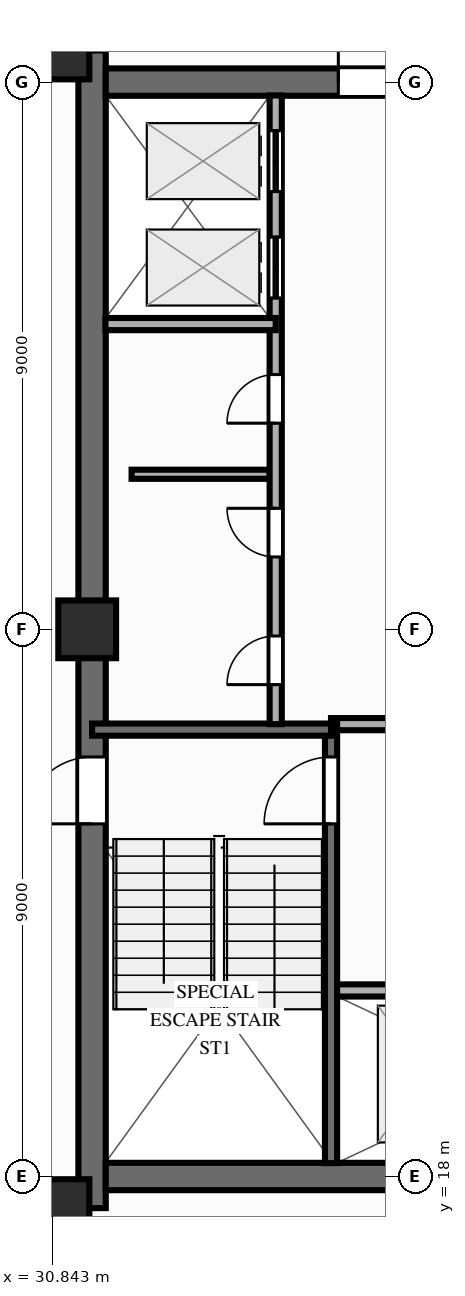
"""IFC4 building model, lengths in metres.
Left out: names, types, materials, properties, quantities, classifications, styles, units other than length and angle.
Written with IfcOpenShell. Run it as: python <this file> out.ifc"""

import sys

from ifc_helpers import new_model, si_unit, direction, frame, frame_2d, origin, origin_2d, place, context, subcontext, project, spatial, rectangle, extrude, source, transform, mapped, element, fill, save


model = new_model("IFC4")
c1 = context("Model", 3, precision=1e-05, world=origin(), true_north=direction((0.0, 1.0)))
c2 = subcontext(c1, "Body", "Model", "MODEL_VIEW")
j1 = project(units=[si_unit("LENGTHUNIT", "METRE"), si_unit("PLANEANGLEUNIT", "RADIAN")], contexts=[c1])
p1 = place(None, origin())
s1 = spatial("IfcSite", under=j1, at=p1, CompositionType="ELEMENT")
p2 = place(p1, origin())
s2 = spatial("IfcBuilding", under=s1, at=p2, CompositionType="ELEMENT")
p3 = place(p2, frame((0.0, 0.0, 216.3)))
s3 = spatial("IfcBuildingStorey", under=s2, at=p3, CompositionType="ELEMENT", Elevation=216.3)
p4 = place(p3, frame((31.5, 17.48, 0.0), z_axis=(0.0, 0.0, 1.0), x_axis=(0.0, 1.0, 0.0)))
e1 = element("IfcWall", 1, at=p4, inside=s3, PredefinedType="SHEAR", context=c2, shape_type="SweptSolid", body=[
    extrude(rectangle(XDim=19.04, YDim=0.45, at=frame_2d((9.52, 0.0))), origin(), (0.0, 0.0, 1.0), 3.9),
])
p5 = place(p4, frame((6.32, 0.0, 0.0)))
e2 = element("IfcOpeningElement", 2, at=p5, cuts=e1, PredefinedType="OPENING", context=c2, shape_type="SweptSolid", body=[
    extrude(rectangle(XDim=1.1, YDim=2.15, at=frame_2d((0.55, 1.075))), frame((0.0, 0.237, 0.0), z_axis=(0.0, -1.0, 0.0), x_axis=(1.0, 0.0, 0.0)), (0.0, 0.0, 1.0), 0.474),
])
p6 = place(p3, frame((31.725, 18.0, 0.0), z_axis=(0.0, 0.0, 1.0), x_axis=(1.0, 0.0, 0.0)))
e3 = element("IfcWall", 3, at=p6, inside=s3, PredefinedType="SHEAR", context=c2, shape_type="SweptSolid", body=[
    extrude(rectangle(XDim=12.55, YDim=0.45, at=frame_2d((6.275, 0.0))), origin(), (0.0, 0.0, 1.0), 3.9),
])
p7 = place(p3, frame((31.725, 36.0, 0.0), z_axis=(0.0, 0.0, 1.0), x_axis=(1.0, 0.0, 0.0)))
e4 = element("IfcWall", 4, at=p7, inside=s3, PredefinedType="SHEAR", context=c2, shape_type="SweptSolid", body=[
    extrude(rectangle(XDim=12.55, YDim=0.45, at=frame_2d((6.275, 0.0))), origin(), (0.0, 0.0, 1.0), 3.9),
])
p8 = place(p7, frame((5.225, 0.0, 0.0), z_axis=(0.0, 0.0, 1.0), x_axis=(-1.0, 0.0, 0.0)))
e5 = element("IfcOpeningElement", 5, at=p8, cuts=e4, PredefinedType="OPENING", context=c2, shape_type="SweptSolid", body=[
    extrude(rectangle(XDim=1.4, YDim=2.15, at=frame_2d((0.7, 1.075))), frame((0.0, 0.237, 0.0), z_axis=(0.0, -1.0, 0.0), x_axis=(1.0, 0.0, 0.0)), (0.0, 0.0, 1.0), 0.474),
])
m1 = source(origin(), c2, "Body", "SweptSolid", [
    extrude(rectangle(XDim=0.95, YDim=0.95, at=origin_2d()), origin(), (0.0, 0.0, 1.0), 3.9),
])
for number, where, z_axis, x_axis in (
    (6, (30.98, 17.48, 0.0), (0.0, 0.0, 1.0), (1.0, 0.0, 0.0)),
    (7, (30.98, 36.52, 0.0), (0.0, 0.0, 1.0), (1.0, 0.0, 0.0)),
    (8, (31.42, 27.0, 0.0), (0.0, 0.0, 1.0), (1.0, 0.0, 0.0)),
):
    element("IfcColumn", number, at=place(p3, frame(where, z_axis=z_axis, x_axis=x_axis)), inside=s3, PredefinedType="COLUMN", context=c2, shape_type="MappedRepresentation", body=[
        mapped(m1, transform((0.0, 0.0, 0.0), scale=1.0)),
    ])
p9 = place(p3, frame((32.15, 29.55, 0.0), z_axis=(0.0, 0.0, 1.0), x_axis=(1.0, 0.0, 0.0)))
e9 = element("IfcWall", 9, at=p9, inside=s3, PredefinedType="PARTITIONING", context=c2, shape_type="SweptSolid", body=[
    extrude(rectangle(XDim=2.27, YDim=0.15, at=frame_2d((1.135, 0.0))), origin(), (0.0, 0.0, 1.0), 3.56),
])
p10 = place(p3, frame((35.43, 21.06, 0.0), z_axis=(0.0, 0.0, 1.0), x_axis=(1.0, 0.0, 0.0)))
e10 = element("IfcWall", 10, at=p10, inside=s3, PredefinedType="PARTITIONING", context=c2, shape_type="SweptSolid", body=[
    extrude(rectangle(XDim=6.02, YDim=0.2, at=frame_2d((3.01, 0.0))), origin(), (0.0, 0.0, 1.0), 3.56),
])
p11 = place(p10, frame((1.0, 0.0, 0.0)))
e11 = element("IfcOpeningElement", 11, at=p11, cuts=e10, PredefinedType="OPENING", context=c2, shape_type="SweptSolid", body=[
    extrude(rectangle(XDim=1.1, YDim=2.15, at=frame_2d((0.55, 1.075))), frame((0.0, 0.112, 0.0), z_axis=(0.0, -1.0, 0.0), x_axis=(1.0, 0.0, 0.0)), (0.0, 0.0, 1.0), 0.224),
])
p12 = place(p10, frame((2.95, 0.0, 0.0)))
e12 = element("IfcOpeningElement", 12, at=p12, cuts=e10, PredefinedType="OPENING", context=c2, shape_type="SweptSolid", body=[
    extrude(rectangle(XDim=1.1, YDim=2.15, at=frame_2d((0.55, 1.075))), frame((0.0, 0.112, 0.0), z_axis=(0.0, -1.0, 0.0), x_axis=(1.0, 0.0, 0.0)), (0.0, 0.0, 1.0), 0.224),
])
p13 = place(p10, frame((4.58, 0.0, 0.0)))
e13 = element("IfcOpeningElement", 13, at=p13, cuts=e10, PredefinedType="OPENING", context=c2, shape_type="SweptSolid", body=[
    extrude(rectangle(XDim=1.2, YDim=2.15, at=frame_2d((0.6, 1.075))), frame((0.0, 0.112, 0.0), z_axis=(0.0, -1.0, 0.0), x_axis=(1.0, 0.0, 0.0)), (0.0, 0.0, 1.0), 0.224),
])
p14 = place(p3, frame((35.43, 25.44, 0.0), z_axis=(0.0, 0.0, 1.0), x_axis=(1.0, 0.0, 0.0)))
e14 = element("IfcWall", 14, at=p14, inside=s3, PredefinedType="PARTITIONING", context=c2, shape_type="SweptSolid", body=[
    extrude(rectangle(XDim=4.72, YDim=0.2, at=frame_2d((2.36, 0.0))), origin(), (0.0, 0.0, 1.0), 3.56),
])
p15 = place(p14, frame((1.25, 0.0, 0.0)))
e15 = element("IfcOpeningElement", 15, at=p15, cuts=e14, PredefinedType="OPENING", context=c2, shape_type="SweptSolid", body=[
    extrude(rectangle(XDim=1.1, YDim=2.15, at=frame_2d((0.55, 1.075))), frame((0.0, 0.112, 0.0), z_axis=(0.0, -1.0, 0.0), x_axis=(1.0, 0.0, 0.0)), (0.0, 0.0, 1.0), 0.224),
])
p16 = place(p3, frame((35.43, 18.22, 0.0), z_axis=(0.0, 0.0, 1.0), x_axis=(0.0, 1.0, 0.0)))
e16 = element("IfcWall", 16, at=p16, inside=s3, PredefinedType="SOLIDWALL", context=c2, shape_type="SweptSolid", body=[
    extrude(rectangle(XDim=7.22, YDim=0.2, at=frame_2d((3.61, 0.0))), origin(), (0.0, 0.0, 1.0), 3.69),
])
p17 = place(p16, frame((6.68, 0.0, 0.0), z_axis=(0.0, 0.0, 1.0), x_axis=(-1.0, 0.0, 0.0)))
e17 = element("IfcOpeningElement", 17, at=p17, cuts=e16, PredefinedType="OPENING", context=c2, shape_type="SweptSolid", body=[
    extrude(rectangle(XDim=1.1, YDim=2.15, at=frame_2d((0.55, 1.075))), frame((0.0, 0.112, 0.0), z_axis=(0.0, -1.0, 0.0), x_axis=(1.0, 0.0, 0.0)), (0.0, 0.0, 1.0), 0.224),
])
p18 = place(p3, frame((31.5, 25.35, 0.0), z_axis=(0.0, 0.0, 1.0), x_axis=(1.0, 0.0, 0.0)))
e18 = element("IfcWall", 18, at=p18, inside=s3, PredefinedType="SOLIDWALL", context=c2, shape_type="SweptSolid", body=[
    extrude(rectangle(XDim=3.93, YDim=0.2, at=frame_2d((1.965, 0.0))), origin(), (0.0, 0.0, 1.0), 3.69),
])
p19 = place(p3, frame((34.52, 25.44, 0.0), z_axis=(0.0, 0.0, 1.0), x_axis=(0.0, 1.0, 0.0)))
e19 = element("IfcWall", 19, at=p19, inside=s3, PredefinedType="PARTITIONING", context=c2, shape_type="SweptSolid", body=[
    extrude(rectangle(XDim=10.34, YDim=0.2, at=frame_2d((5.17, 0.0))), origin(), (0.0, 0.0, 1.0), 3.56),
])
p20 = place(p19, frame((0.65, 0.0, 0.0)))
e20 = element("IfcOpeningElement", 20, at=p20, cuts=e19, PredefinedType="OPENING", context=c2, shape_type="SweptSolid", body=[
    extrude(rectangle(XDim=0.8, YDim=2.05, at=frame_2d((0.4, 1.025))), frame((0.0, 0.112, 0.0), z_axis=(0.0, -1.0, 0.0), x_axis=(1.0, 0.0, 0.0)), (0.0, 0.0, 1.0), 0.224),
])
p21 = place(p19, frame((2.75, 0.0, 0.0)))
e21 = element("IfcOpeningElement", 21, at=p21, cuts=e19, PredefinedType="OPENING", context=c2, shape_type="SweptSolid", body=[
    extrude(rectangle(XDim=0.8, YDim=2.05, at=frame_2d((0.4, 1.025))), frame((0.0, 0.112, 0.0), z_axis=(0.0, -1.0, 0.0), x_axis=(1.0, 0.0, 0.0)), (0.0, 0.0, 1.0), 0.224),
])
p22 = place(p19, frame((4.95, 0.0, 0.0)))
e22 = element("IfcOpeningElement", 22, at=p22, cuts=e19, PredefinedType="OPENING", context=c2, shape_type="SweptSolid", body=[
    extrude(rectangle(XDim=0.8, YDim=2.05, at=frame_2d((0.4, 1.025))), frame((0.0, 0.112, 0.0), z_axis=(0.0, -1.0, 0.0), x_axis=(1.0, 0.0, 0.0)), (0.0, 0.0, 1.0), 0.224),
])
p23 = place(p19, frame((7.01, 0.0, 0.0)))
e23 = element("IfcOpeningElement", 23, at=p23, cuts=e19, PredefinedType="OPENING", context=c2, shape_type="SweptSolid", body=[
    extrude(rectangle(XDim=1.0, YDim=2.15, at=frame_2d((0.5, 1.075))), frame((0.0, 0.112, 0.0), z_axis=(0.0, -1.0, 0.0), x_axis=(1.0, 0.0, 0.0)), (0.0, 0.0, 1.0), 0.224),
])
p24 = place(p19, frame((8.76, 0.0, 0.0)))
e24 = element("IfcOpeningElement", 24, at=p24, cuts=e19, PredefinedType="OPENING", context=c2, shape_type="SweptSolid", body=[
    extrude(rectangle(XDim=1.0, YDim=2.15, at=frame_2d((0.5, 1.075))), frame((0.0, 0.112, 0.0), z_axis=(0.0, -1.0, 0.0), x_axis=(1.0, 0.0, 0.0)), (0.0, 0.0, 1.0), 0.224),
])
p25 = place(p3, frame((31.72, 32.02, 0.0), z_axis=(0.0, 0.0, 1.0), x_axis=(1.0, 0.0, 0.0)))
e25 = element("IfcWall", 25, at=p25, inside=s3, PredefinedType="PARTITIONING", context=c2, shape_type="SweptSolid", body=[
    extrude(rectangle(XDim=2.8, YDim=0.2, at=frame_2d((1.4, 0.0))), origin(), (0.0, 0.0, 1.0), 3.56),
])
m2 = source(origin(), c2, "Body", "SweptSolid", [
    extrude(rectangle(XDim=1.1, YDim=2.15, at=frame_2d((0.55, 1.075))), frame((0.0, 0.025, 0.0), z_axis=(0.0, -1.0, 0.0), x_axis=(1.0, 0.0, 0.0)), (0.0, 0.0, 1.0), 0.05),
])
p26 = place(p5, origin())
e26 = element("IfcDoor", 26, at=p26, inside=s3, OperationType="SINGLE_SWING_LEFT", PredefinedType="DOOR", context=c2, shape_type="MappedRepresentation", body=[
    mapped(m2, transform((0.0, 0.0, 0.0), scale=1.0)),
])
fill(e2, e26)
m3 = source(origin(), c2, "Body", "SweptSolid", [
    extrude(rectangle(XDim=1.4, YDim=2.15, at=frame_2d((0.7, 1.075))), frame((0.0, 0.025, 0.0), z_axis=(0.0, -1.0, 0.0), x_axis=(1.0, 0.0, 0.0)), (0.0, 0.0, 1.0), 0.05),
])
p27 = place(p8, origin())
e27 = element("IfcDoor", 27, at=p27, inside=s3, OperationType="SINGLE_SWING_RIGHT", PredefinedType="DOOR", context=c2, shape_type="MappedRepresentation", body=[
    mapped(m3, transform((0.0, 0.0, 0.0), scale=1.0)),
])
fill(e5, e27)
p28 = place(p17, origin())
e28 = element("IfcDoor", 28, at=p28, inside=s3, OperationType="SINGLE_SWING_RIGHT", PredefinedType="DOOR", context=c2, shape_type="MappedRepresentation", body=[
    mapped(m2, transform((0.0, 0.0, 0.0), scale=1.0)),
])
fill(e17, e28)
m4 = source(origin(), c2, "Body", "SweptSolid", [
    extrude(rectangle(XDim=0.8, YDim=2.05, at=frame_2d((0.4, 1.025))), frame((0.0, 0.025, 0.0), z_axis=(0.0, -1.0, 0.0), x_axis=(1.0, 0.0, 0.0)), (0.0, 0.0, 1.0), 0.05),
])
p29 = place(p20, origin())
e29 = element("IfcDoor", 29, at=p29, inside=s3, OperationType="SINGLE_SWING_LEFT", PredefinedType="DOOR", context=c2, shape_type="MappedRepresentation", body=[
    mapped(m4, transform((0.0, 0.0, 0.0), scale=1.0)),
])
fill(e20, e29)
p30 = place(p21, origin())
e30 = element("IfcDoor", 30, at=p30, inside=s3, OperationType="SINGLE_SWING_RIGHT", PredefinedType="DOOR", context=c2, shape_type="MappedRepresentation", body=[
    mapped(m4, transform((0.0, 0.0, 0.0), scale=1.0)),
])
fill(e21, e30)
p31 = place(p22, origin())
e31 = element("IfcDoor", 31, at=p31, inside=s3, OperationType="SINGLE_SWING_LEFT", PredefinedType="DOOR", context=c2, shape_type="MappedRepresentation", body=[
    mapped(m4, transform((0.0, 0.0, 0.0), scale=1.0)),
])
fill(e22, e31)
m5 = source(origin(), c2, "Body", "SweptSolid", [
    extrude(rectangle(XDim=1.0, YDim=2.15, at=frame_2d((0.5, 1.075))), frame((0.0, 0.025, 0.0), z_axis=(0.0, -1.0, 0.0), x_axis=(1.0, 0.0, 0.0)), (0.0, 0.0, 1.0), 0.05),
])
p32 = place(p23, origin())
e32 = element("IfcDoor", 32, at=p32, inside=s3, OperationType="DOUBLE_DOOR_SLIDING", PredefinedType="DOOR", context=c2, shape_type="MappedRepresentation", body=[
    mapped(m5, transform((0.0, 0.0, 0.0), scale=1.0)),
])
fill(e23, e32)
p33 = place(p24, origin())
e33 = element("IfcDoor", 33, at=p33, inside=s3, OperationType="DOUBLE_DOOR_SLIDING", PredefinedType="DOOR", context=c2, shape_type="MappedRepresentation", body=[
    mapped(m5, transform((0.0, 0.0, 0.0), scale=1.0)),
])
fill(e24, e33)
save(model, sys.argv[1])
